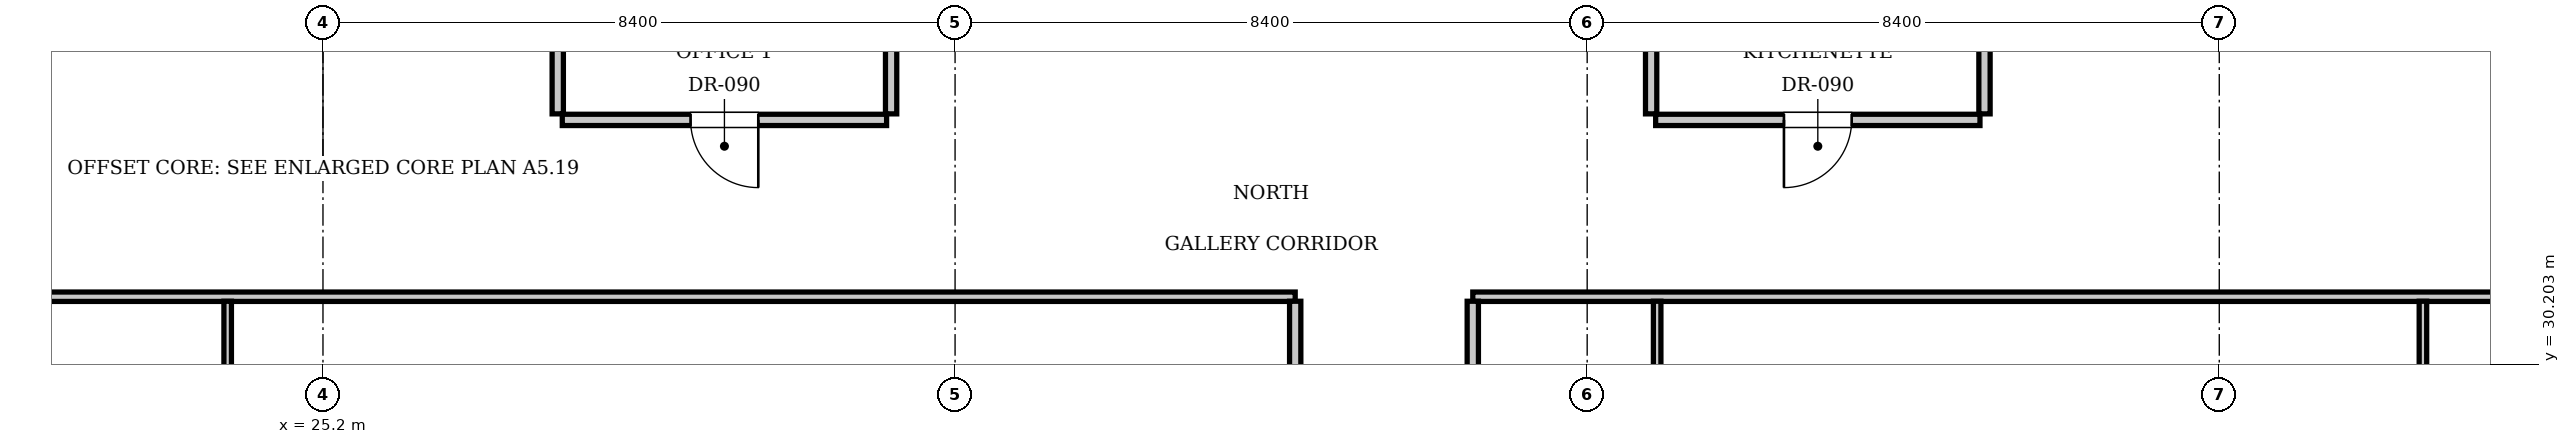
"""IFC4 building model, lengths in metres.
Left out: names, types, materials, properties, quantities, classifications, styles, units other than length and angle.
Written with IfcOpenShell. Run it as: python <this file> out.ifc"""

import sys

from ifc_helpers import new_model, si_unit, direction, frame, frame_2d, origin, place, context, subcontext, project, spatial, rectangle, extrude, element, fill, save


model = new_model("IFC4")
c1 = context("Model", 3, precision=1e-05, world=origin(), true_north=direction((0.0, 1.0)))
c2 = subcontext(c1, "Body", "Model", "MODEL_VIEW")
j1 = project(units=[si_unit("LENGTHUNIT", "METRE"), si_unit("PLANEANGLEUNIT", "RADIAN")], contexts=[c1])
p1 = place(None, origin())
s1 = spatial("IfcSite", under=j1, at=p1, CompositionType="ELEMENT")
p2 = place(p1, origin())
s2 = spatial("IfcBuilding", under=s1, at=p2, CompositionType="ELEMENT")
p3 = place(p2, frame((0.0, 0.0, 158.2)))
s3 = spatial("IfcBuildingStorey", under=s2, at=p3, CompositionType="ELEMENT", Elevation=158.2)
for number, where, z_axis, x_axis in (
    (1, (28.32, 33.53, 0.0), (0.0, 0.0, 1.0), (0.0, 1.0, 0.0)),
    (2, (32.75, 33.53, 0.0), (0.0, 0.0, 1.0), (0.0, 1.0, 0.0)),
):
    element("IfcWall", number, at=place(p3, frame(where, z_axis=z_axis, x_axis=x_axis)), inside=s3, PredefinedType="PARTITIONING", context=c2, shape_type="SweptSolid", body=[
        extrude(rectangle(XDim=2.59, YDim=0.15, at=frame_2d((1.295, 0.0))), origin(), (0.0, 0.0, 1.0), 3.61),
    ])
p4 = place(p3, frame((28.38, 33.45, 0.0), z_axis=(0.0, 0.0, 1.0), x_axis=(1.0, 0.0, 0.0)))
e3 = element("IfcWall", 3, at=p4, inside=s3, PredefinedType="PARTITIONING", context=c2, shape_type="SweptSolid", body=[
    extrude(rectangle(XDim=4.31, YDim=0.15, at=frame_2d((2.155, 0.0))), origin(), (0.0, 0.0, 1.0), 3.61),
])
p5 = place(p4, frame((1.705, 0.0, 0.0)))
e4 = element("IfcOpeningElement", 4, at=p5, cuts=e3, PredefinedType="OPENING", context=c2, shape_type="SweptSolid", body=[
    extrude(rectangle(XDim=0.9, YDim=2.1, at=frame_2d((0.45, 1.05))), frame((0.0, 0.085, 0.0), z_axis=(0.0, -1.0, 0.0), x_axis=(1.0, 0.0, 0.0)), (0.0, 0.0, 1.0), 0.17),
])
for number, where, z_axis, x_axis in (
    (5, (42.85, 33.53, 0.0), (0.0, 0.0, 1.0), (0.0, 1.0, 0.0)),
    (6, (47.28, 33.53, 0.0), (0.0, 0.0, 1.0), (0.0, 1.0, 0.0)),
):
    element("IfcWall", number, at=place(p3, frame(where, z_axis=z_axis, x_axis=x_axis)), inside=s3, PredefinedType="PARTITIONING", context=c2, shape_type="SweptSolid", body=[
        extrude(rectangle(XDim=2.59, YDim=0.15, at=frame_2d((1.295, 0.0))), origin(), (0.0, 0.0, 1.0), 3.61),
    ])
p6 = place(p3, frame((42.91, 33.45, 0.0), z_axis=(0.0, 0.0, 1.0), x_axis=(1.0, 0.0, 0.0)))
e7 = element("IfcWall", 7, at=p6, inside=s3, PredefinedType="PARTITIONING", context=c2, shape_type="SweptSolid", body=[
    extrude(rectangle(XDim=4.31, YDim=0.15, at=frame_2d((2.155, 0.0))), origin(), (0.0, 0.0, 1.0), 3.61),
])
p7 = place(p6, frame((1.705, 0.0, 0.0)))
e8 = element("IfcOpeningElement", 8, at=p7, cuts=e7, PredefinedType="OPENING", context=c2, shape_type="SweptSolid", body=[
    extrude(rectangle(XDim=0.9, YDim=2.1, at=frame_2d((0.45, 1.05))), frame((0.0, 0.085, 0.0), z_axis=(0.0, -1.0, 0.0), x_axis=(1.0, 0.0, 0.0)), (0.0, 0.0, 1.0), 0.17),
])
p8 = place(p3, frame((13.2, 31.1, 0.0), z_axis=(0.0, 0.0, 1.0), x_axis=(1.0, 0.0, 0.0)))
e9 = element("IfcWall", 9, at=p8, inside=s3, PredefinedType="PARTITIONING", context=c2, shape_type="SweptSolid", body=[
    extrude(rectangle(XDim=24.92, YDim=0.125, at=frame_2d((12.46, 0.0))), origin(), (0.0, 0.0, 1.0), 3.61),
])
p9 = place(p3, frame((40.48, 31.1, 0.0), z_axis=(0.0, 0.0, 1.0), x_axis=(1.0, 0.0, 0.0)))
e10 = element("IfcWall", 10, at=p9, inside=s3, PredefinedType="PARTITIONING", context=c2, shape_type="SweptSolid", body=[
    extrude(rectangle(XDim=21.92, YDim=0.125, at=frame_2d((10.96, 0.0))), origin(), (0.0, 0.0, 1.0), 3.61),
])
p10 = place(p3, frame((38.12, 27.56, 0.0), z_axis=(0.0, 0.0, 1.0), x_axis=(0.0, 1.0, 0.0)))
e11 = element("IfcWall", 11, at=p10, inside=s3, PredefinedType="PARTITIONING", context=c2, shape_type="SweptSolid", body=[
    extrude(rectangle(XDim=3.48, YDim=0.15, at=frame_2d((1.74, 0.0))), origin(), (0.0, 0.0, 1.0), 3.61),
])
p11 = place(p10, frame((1.265, 0.0, 0.0)))
e12 = element("IfcOpeningElement", 12, at=p11, cuts=e11, PredefinedType="OPENING", context=c2, shape_type="SweptSolid", body=[
    extrude(rectangle(XDim=0.95, YDim=2.15, at=frame_2d((0.475, 1.075))), frame((0.0, 0.085, 0.0), z_axis=(0.0, -1.0, 0.0), x_axis=(1.0, 0.0, 0.0)), (0.0, 0.0, 1.0), 0.17),
])
p12 = place(p3, frame((23.934, 25.63, 0.0), z_axis=(0.0, 0.0, 1.0), x_axis=(0.0, 1.0, 0.0)))
e13 = element("IfcWall", 13, at=p12, inside=s3, PredefinedType="PARTITIONING", context=c2, shape_type="SweptSolid", body=[
    extrude(rectangle(XDim=5.41, YDim=0.1, at=frame_2d((2.705, 0.0))), origin(), (0.0, 0.0, 1.0), 3.61),
])
p13 = place(p12, frame((2.735, 0.0, 0.0)))
e14 = element("IfcOpeningElement", 14, at=p13, cuts=e13, PredefinedType="OPENING", context=c2, shape_type="SweptSolid", body=[
    extrude(rectangle(XDim=0.9, YDim=2.1, at=frame_2d((0.45, 1.05))), frame((0.0, 0.06, 0.0), z_axis=(0.0, -1.0, 0.0), x_axis=(1.0, 0.0, 0.0)), (0.0, 0.0, 1.0), 0.12),
])
p14 = place(p3, frame((40.48, 29.11, 0.0), z_axis=(0.0, 0.0, 1.0), x_axis=(0.0, 1.0, 0.0)))
e15 = element("IfcWall", 15, at=p14, inside=s3, PredefinedType="PARTITIONING", context=c2, shape_type="SweptSolid", body=[
    extrude(rectangle(XDim=1.93, YDim=0.15, at=frame_2d((0.965, 0.0))), origin(), (0.0, 0.0, 1.0), 3.61),
])
p15 = place(p3, frame((42.93, 29.11, 0.0), z_axis=(0.0, 0.0, 1.0), x_axis=(0.0, 1.0, 0.0)))
e16 = element("IfcWall", 16, at=p15, inside=s3, PredefinedType="PARTITIONING", context=c2, shape_type="SweptSolid", body=[
    extrude(rectangle(XDim=1.93, YDim=0.1, at=frame_2d((0.965, 0.0))), origin(), (0.0, 0.0, 1.0), 3.61),
])
p16 = place(p3, frame((53.106, 25.63, 0.0), z_axis=(0.0, 0.0, 1.0), x_axis=(0.0, 1.0, 0.0)))
e17 = element("IfcWall", 17, at=p16, inside=s3, PredefinedType="PARTITIONING", context=c2, shape_type="SweptSolid", body=[
    extrude(rectangle(XDim=5.41, YDim=0.1, at=frame_2d((2.705, 0.0))), origin(), (0.0, 0.0, 1.0), 3.61),
])
p17 = place(p16, frame((2.255, 0.0, 0.0)))
e18 = element("IfcOpeningElement", 18, at=p17, cuts=e17, PredefinedType="OPENING", context=c2, shape_type="SweptSolid", body=[
    extrude(rectangle(XDim=0.9, YDim=2.1, at=frame_2d((0.45, 1.05))), frame((0.0, 0.06, 0.0), z_axis=(0.0, -1.0, 0.0), x_axis=(1.0, 0.0, 0.0)), (0.0, 0.0, 1.0), 0.12),
])
p18 = place(p5, frame((0.9, 0.0, 0.0), z_axis=(0.0, 0.0, 1.0), x_axis=(-1.0, 0.0, 0.0)))
e19 = element("IfcDoor", 19, at=p18, inside=s3, OperationType="SINGLE_SWING_LEFT", PredefinedType="DOOR", context=c2, shape_type="SweptSolid", body=[
    extrude(rectangle(XDim=0.9, YDim=2.1, at=frame_2d((0.45, 1.05))), frame((0.0, 0.025, 0.0), z_axis=(0.0, -1.0, 0.0), x_axis=(1.0, 0.0, 0.0)), (0.0, 0.0, 1.0), 0.05),
])
fill(e4, e19)
p19 = place(p7, frame((0.9, 0.0, 0.0), z_axis=(0.0, 0.0, 1.0), x_axis=(-1.0, 0.0, 0.0)))
e20 = element("IfcDoor", 20, at=p19, inside=s3, OperationType="SINGLE_SWING_RIGHT", PredefinedType="DOOR", context=c2, shape_type="SweptSolid", body=[
    extrude(rectangle(XDim=0.9, YDim=2.1, at=frame_2d((0.45, 1.05))), frame((0.0, 0.025, 0.0), z_axis=(0.0, -1.0, 0.0), x_axis=(1.0, 0.0, 0.0)), (0.0, 0.0, 1.0), 0.05),
])
fill(e8, e20)
save(model, sys.argv[1])
